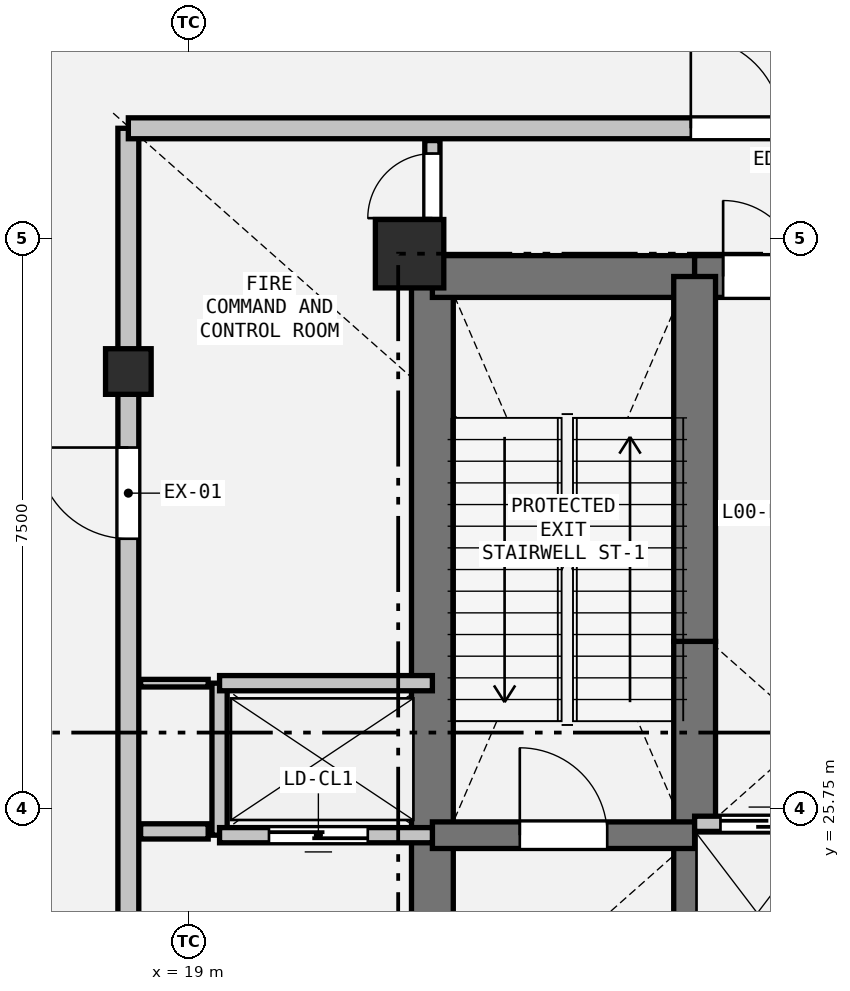
"""IFC4 building model, lengths in metres.
Left out: names, types, materials, properties, quantities, classifications, styles, units other than length and angle.
Written with IfcOpenShell. Run it as: python <this file> out.ifc"""

import sys

from ifc_helpers import new_model, si_unit, direction, frame, frame_2d, origin, origin_2d, place, context, subcontext, project, spatial, rectangle, extrude, element, fill, save


model = new_model("IFC4")
c1 = context("Model", 3, precision=1e-05, world=origin(), true_north=direction((0.0, 1.0)))
c2 = subcontext(c1, "Body", "Model", "MODEL_VIEW")
j1 = project(units=[si_unit("LENGTHUNIT", "METRE"), si_unit("PLANEANGLEUNIT", "RADIAN")], contexts=[c1])
p1 = place(None, origin())
s1 = spatial("IfcSite", under=j1, at=p1, CompositionType="ELEMENT")
p2 = place(p1, origin())
s2 = spatial("IfcBuilding", under=s1, at=p2, CompositionType="ELEMENT")
p3 = place(p2, origin())
s3 = spatial("IfcBuildingStorey", under=s2, at=p3, CompositionType="ELEMENT", Elevation=0.0)
p4 = place(p3, frame((18.2, 31.5, 0.0), z_axis=(0.0, 0.0, 1.0), x_axis=(1.0, 0.0, 0.0)))
e1 = element("IfcColumn", 1, at=p4, inside=s3, PredefinedType="COLUMN", context=c2, shape_type="SweptSolid", body=[
    extrude(rectangle(XDim=0.6, YDim=0.6, at=origin_2d()), origin(), (0.0, 0.0, 1.0), 5.1),
])
p5 = place(p3, frame((21.9, 33.05, 0.0), z_axis=(0.0, 0.0, 1.0), x_axis=(1.0, 0.0, 0.0)))
e2 = element("IfcColumn", 2, at=p5, inside=s3, PredefinedType="COLUMN", context=c2, shape_type="SweptSolid", body=[
    extrude(rectangle(XDim=0.9, YDim=0.9, at=origin_2d()), origin(), (0.0, 0.0, 1.0), 5.1),
])
p6 = place(p3, frame((18.2, 18.8, 0.0), z_axis=(0.0, 0.0, 1.0), x_axis=(0.0, 1.0, 0.0)))
e3 = element("IfcWall", 3, at=p6, inside=s3, PredefinedType="SOLIDWALL", context=c2, shape_type="SweptSolid", body=[
    extrude(rectangle(XDim=15.9, YDim=0.275, at=frame_2d((7.95, 0.0))), origin(), (0.0, 0.0, 1.0), 3.185),
])
p7 = place(p6, frame((10.5, 0.0, 0.0)))
e4 = element("IfcOpeningElement", 4, at=p7, cuts=e3, PredefinedType="OPENING", context=c2, shape_type="SweptSolid", body=[
    extrude(rectangle(XDim=1.2, YDim=2.2, at=frame_2d((0.6, 1.1))), frame((0.0, 0.147, 0.0), z_axis=(0.0, -1.0, 0.0), x_axis=(1.0, 0.0, 0.0)), (0.0, 0.0, 1.0), 0.295),
])
p8 = place(p3, frame((18.2, 34.7, 0.0), z_axis=(0.0, 0.0, 1.0), x_axis=(1.0, 0.0, 0.0)))
e5 = element("IfcWall", 5, at=p8, inside=s3, PredefinedType="SOLIDWALL", context=c2, shape_type="SweptSolid", body=[
    extrude(rectangle(XDim=18.0, YDim=0.275, at=frame_2d((9.0, 0.0))), origin(), (0.0, 0.0, 1.0), 3.185),
])
p9 = place(p8, frame((7.4, 0.0, 0.0)))
e6 = element("IfcOpeningElement", 6, at=p9, cuts=e5, PredefinedType="OPENING", context=c2, shape_type="SweptSolid", body=[
    extrude(rectangle(XDim=2.4, YDim=2.4, at=frame_2d((1.2, 1.2))), frame((0.0, 0.147, 0.0), z_axis=(0.0, -1.0, 0.0), x_axis=(1.0, 0.0, 0.0)), (0.0, 0.0, 1.0), 0.295),
])
p10 = place(p3, frame((22.2, 20.75, 0.0), z_axis=(0.0, 0.0, 1.0), x_axis=(0.0, 1.0, 0.0)))
e7 = element("IfcWall", 7, at=p10, inside=s3, PredefinedType="SHEAR", context=c2, shape_type="SweptSolid", body=[
    extrude(rectangle(XDim=4.65, YDim=0.55, at=frame_2d((2.325, 0.0))), origin(), (0.0, 0.0, 1.0), 4.8),
])
p11 = place(p3, frame((22.2, 25.4, 0.0), z_axis=(0.0, 0.0, 1.0), x_axis=(0.0, 1.0, 0.0)))
e8 = element("IfcWall", 8, at=p11, inside=s3, PredefinedType="SHEAR", context=c2, shape_type="SweptSolid", body=[
    extrude(rectangle(XDim=7.35, YDim=0.55, at=frame_2d((3.675, 0.0))), origin(), (0.0, 0.0, 1.0), 4.8),
])
p12 = place(p3, frame((22.2, 32.75, 0.0), z_axis=(0.0, 0.0, 1.0), x_axis=(1.0, 0.0, 0.0)))
e9 = element("IfcWall", 9, at=p12, inside=s3, PredefinedType="SHEAR", context=c2, shape_type="SweptSolid", body=[
    extrude(rectangle(XDim=3.45, YDim=0.55, at=frame_2d((1.725, 0.0))), origin(), (0.0, 0.0, 1.0), 4.8),
])
p13 = place(p3, frame((25.65, 32.75, 0.0), z_axis=(0.0, 0.0, 1.0), x_axis=(1.0, 0.0, 0.0)))
e10 = element("IfcWall", 10, at=p13, inside=s3, PredefinedType="SHEAR", context=c2, shape_type="SweptSolid", body=[
    extrude(rectangle(XDim=1.75, YDim=0.55, at=frame_2d((0.875, 0.0))), origin(), (0.0, 0.0, 1.0), 4.8),
])
p14 = place(p13, frame((0.375, 0.0, 0.0)))
e11 = element("IfcOpeningElement", 11, at=p14, cuts=e10, PredefinedType="OPENING", context=c2, shape_type="SweptSolid", body=[
    extrude(rectangle(XDim=1.0, YDim=2.15, at=frame_2d((0.5, 1.075))), frame((0.0, 0.285, 0.0), z_axis=(0.0, -1.0, 0.0), x_axis=(1.0, 0.0, 0.0)), (0.0, 0.0, 1.0), 0.57),
])
p15 = place(p3, frame((25.65, 22.75, 0.0), z_axis=(0.0, 0.0, 1.0), x_axis=(0.0, 1.0, 0.0)))
e12 = element("IfcWall", 12, at=p15, inside=s3, PredefinedType="SHEAR", context=c2, shape_type="SweptSolid", body=[
    extrude(rectangle(XDim=2.8, YDim=0.55, at=frame_2d((1.4, 0.0))), origin(), (0.0, 0.0, 1.0), 4.8),
])
p16 = place(p3, frame((25.65, 25.55, 0.0), z_axis=(0.0, 0.0, 1.0), x_axis=(0.0, 1.0, 0.0)))
e13 = element("IfcWall", 13, at=p16, inside=s3, PredefinedType="SHEAR", context=c2, shape_type="SweptSolid", body=[
    extrude(rectangle(XDim=2.4, YDim=0.55, at=frame_2d((1.2, 0.0))), origin(), (0.0, 0.0, 1.0), 4.8),
])
p17 = place(p3, frame((25.65, 27.95, 0.0), z_axis=(0.0, 0.0, 1.0), x_axis=(0.0, 1.0, 0.0)))
e14 = element("IfcWall", 14, at=p17, inside=s3, PredefinedType="SHEAR", context=c2, shape_type="SweptSolid", body=[
    extrude(rectangle(XDim=4.8, YDim=0.55, at=frame_2d((2.4, 0.0))), origin(), (0.0, 0.0, 1.0), 4.8),
])
p18 = place(p3, frame((22.2, 25.4, 0.0), z_axis=(0.0, 0.0, 1.0), x_axis=(1.0, 0.0, 0.0)))
e15 = element("IfcWall", 15, at=p18, inside=s3, PredefinedType="SHEAR", context=c2, shape_type="SweptSolid", body=[
    extrude(rectangle(XDim=3.45, YDim=0.35, at=frame_2d((1.725, 0.0))), origin(), (0.0, 0.0, 1.0), 4.8),
])
p19 = place(p18, frame((1.15, 0.0, 0.0)))
e16 = element("IfcOpeningElement", 16, at=p19, cuts=e15, PredefinedType="OPENING", context=c2, shape_type="SweptSolid", body=[
    extrude(rectangle(XDim=1.15, YDim=2.15, at=frame_2d((0.575, 1.075))), frame((0.0, 0.185, 0.0), z_axis=(0.0, -1.0, 0.0), x_axis=(1.0, 0.0, 0.0)), (0.0, 0.0, 1.0), 0.37),
])
p20 = place(p3, frame((25.65, 25.55, 0.0), z_axis=(0.0, 0.0, 1.0), x_axis=(1.0, 0.0, 0.0)))
e17 = element("IfcWall", 17, at=p20, inside=s3, PredefinedType="PARTITIONING", context=c2, shape_type="SweptSolid", body=[
    extrude(rectangle(XDim=4.95, YDim=0.2, at=frame_2d((2.475, 0.0))), origin(), (0.0, 0.0, 1.0), 4.8),
])
p21 = place(p20, frame((0.34, 0.0, 0.0)))
e18 = element("IfcOpeningElement", 18, at=p21, cuts=e17, PredefinedType="OPENING", context=c2, shape_type="SweptSolid", body=[
    extrude(rectangle(XDim=1.1, YDim=2.15, at=frame_2d((0.55, 1.075))), frame((0.0, 0.11, 0.0), z_axis=(0.0, -1.0, 0.0), x_axis=(1.0, 0.0, 0.0)), (0.0, 0.0, 1.0), 0.22),
])
p22 = place(p20, frame((1.99, 0.0, 0.0)))
e19 = element("IfcOpeningElement", 19, at=p22, cuts=e17, PredefinedType="OPENING", context=c2, shape_type="SweptSolid", body=[
    extrude(rectangle(XDim=1.1, YDim=2.15, at=frame_2d((0.55, 1.075))), frame((0.0, 0.11, 0.0), z_axis=(0.0, -1.0, 0.0), x_axis=(1.0, 0.0, 0.0)), (0.0, 0.0, 1.0), 0.22),
])
p23 = place(p20, frame((3.64, 0.0, 0.0)))
e20 = element("IfcOpeningElement", 20, at=p23, cuts=e17, PredefinedType="OPENING", context=c2, shape_type="SweptSolid", body=[
    extrude(rectangle(XDim=1.1, YDim=2.15, at=frame_2d((0.55, 1.075))), frame((0.0, 0.11, 0.0), z_axis=(0.0, -1.0, 0.0), x_axis=(1.0, 0.0, 0.0)), (0.0, 0.0, 1.0), 0.22),
])
p24 = place(p3, frame((19.4, 25.4, 0.0), z_axis=(0.0, 0.0, 1.0), x_axis=(0.0, 1.0, 0.0)))
e21 = element("IfcWall", 21, at=p24, inside=s3, PredefinedType="PARTITIONING", context=c2, shape_type="SweptSolid", body=[
    extrude(rectangle(XDim=2.0, YDim=0.2, at=frame_2d((1.0, 0.0))), origin(), (0.0, 0.0, 1.0), 3.185),
])
p25 = place(p3, frame((19.4, 27.4, 0.0), z_axis=(0.0, 0.0, 1.0), x_axis=(1.0, 0.0, 0.0)))
e22 = element("IfcWall", 22, at=p25, inside=s3, PredefinedType="PARTITIONING", context=c2, shape_type="SweptSolid", body=[
    extrude(rectangle(XDim=2.8, YDim=0.2, at=frame_2d((1.4, 0.0))), origin(), (0.0, 0.0, 1.0), 4.8),
])
p26 = place(p3, frame((22.2, 25.4, 0.0), z_axis=(0.0, 0.0, 1.0), x_axis=(-1.0, 0.0, 0.0)))
e23 = element("IfcWall", 23, at=p26, inside=s3, PredefinedType="PARTITIONING", context=c2, shape_type="SweptSolid", body=[
    extrude(rectangle(XDim=2.8, YDim=0.2, at=frame_2d((1.4, 0.0))), origin(), (0.0, 0.0, 1.0), 3.185),
])
p27 = place(p26, frame((0.85, 0.0, 0.0)))
e24 = element("IfcOpeningElement", 24, at=p27, cuts=e23, PredefinedType="OPENING", context=c2, shape_type="SweptSolid", body=[
    extrude(rectangle(XDim=1.3, YDim=2.2, at=frame_2d((0.65, 1.1))), frame((0.0, 0.11, 0.0), z_axis=(0.0, -1.0, 0.0), x_axis=(1.0, 0.0, 0.0)), (0.0, 0.0, 1.0), 0.22),
])
p28 = place(p3, frame((22.2, 33.075, 0.0), z_axis=(0.0, 0.0, 1.0), x_axis=(0.0, 1.0, 0.0)))
e25 = element("IfcWall", 25, at=p28, inside=s3, PredefinedType="PARTITIONING", context=c2, shape_type="SweptSolid", body=[
    extrude(rectangle(XDim=1.464, YDim=0.2, at=frame_2d((0.732, 0.0))), origin(), (0.0, 0.0, 1.0), 4.8),
])
p29 = place(p28, frame((0.443, 0.0, 0.0)))
e26 = element("IfcOpeningElement", 26, at=p29, cuts=e25, PredefinedType="OPENING", context=c2, shape_type="SweptSolid", body=[
    extrude(rectangle(XDim=0.85, YDim=2.1, at=frame_2d((0.425, 1.05))), frame((0.0, 0.11, 0.0), z_axis=(0.0, -1.0, 0.0), x_axis=(1.0, 0.0, 0.0)), (0.0, 0.0, 1.0), 0.22),
])
p30 = place(p3, frame((18.362, 25.45, 0.0), z_axis=(0.0, 0.0, 1.0), x_axis=(1.0, 0.0, 0.0)))
e27 = element("IfcWall", 27, at=p30, inside=s3, PredefinedType="PARTITIONING", context=c2, shape_type="SweptSolid", body=[
    extrude(rectangle(XDim=0.888, YDim=0.2, at=frame_2d((0.444, 0.0))), origin(), (0.0, 0.0, 1.0), 3.185),
])
p31 = place(p3, frame((19.25, 27.4, 0.0), z_axis=(0.0, 0.0, 1.0), x_axis=(-1.0, 0.0, 0.0)))
e28 = element("IfcWall", 28, at=p31, inside=s3, PredefinedType="PARTITIONING", context=c2, shape_type="SweptSolid", body=[
    extrude(rectangle(XDim=0.888, YDim=0.1, at=frame_2d((0.444, 0.0))), origin(), (0.0, 0.0, 1.0), 3.185),
])
p32 = place(p9, origin())
e29 = element("IfcDoor", 29, at=p32, inside=s3, OperationType="DOUBLE_DOOR_SINGLE_SWING", PredefinedType="DOOR", context=c2, shape_type="SweptSolid", body=[
    extrude(rectangle(XDim=2.4, YDim=2.4, at=frame_2d((1.2, 1.2))), frame((0.0, 0.025, 0.0), z_axis=(0.0, -1.0, 0.0), x_axis=(1.0, 0.0, 0.0)), (0.0, 0.0, 1.0), 0.05),
])
fill(e6, e29)
p33 = place(p7, origin())
e30 = element("IfcDoor", 30, at=p33, inside=s3, OperationType="SINGLE_SWING_RIGHT", PredefinedType="DOOR", context=c2, shape_type="SweptSolid", body=[
    extrude(rectangle(XDim=1.2, YDim=2.2, at=frame_2d((0.6, 1.1))), frame((0.0, 0.025, 0.0), z_axis=(0.0, -1.0, 0.0), x_axis=(1.0, 0.0, 0.0)), (0.0, 0.0, 1.0), 0.05),
])
fill(e4, e30)
p34 = place(p21, origin())
e31 = element("IfcDoor", 31, at=p34, inside=s3, OperationType="SLIDING_TO_LEFT", PredefinedType="DOOR", context=c2, shape_type="SweptSolid", body=[
    extrude(rectangle(XDim=1.1, YDim=2.15, at=frame_2d((0.55, 1.075))), frame((0.0, 0.025, 0.0), z_axis=(0.0, -1.0, 0.0), x_axis=(1.0, 0.0, 0.0)), (0.0, 0.0, 1.0), 0.05),
])
fill(e18, e31)
p35 = place(p14, origin())
e32 = element("IfcDoor", 32, at=p35, inside=s3, OperationType="SINGLE_SWING_LEFT", PredefinedType="DOOR", context=c2, shape_type="SweptSolid", body=[
    extrude(rectangle(XDim=1.0, YDim=2.15, at=frame_2d((0.5, 1.075))), frame((0.0, 0.025, 0.0), z_axis=(0.0, -1.0, 0.0), x_axis=(1.0, 0.0, 0.0)), (0.0, 0.0, 1.0), 0.05),
])
fill(e11, e32)
p36 = place(p27, origin())
e33 = element("IfcDoor", 33, at=p36, inside=s3, OperationType="SLIDING_TO_LEFT", PredefinedType="DOOR", context=c2, shape_type="SweptSolid", body=[
    extrude(rectangle(XDim=1.3, YDim=2.2, at=frame_2d((0.65, 1.1))), frame((0.0, 0.025, 0.0), z_axis=(0.0, -1.0, 0.0), x_axis=(1.0, 0.0, 0.0)), (0.0, 0.0, 1.0), 0.05),
])
fill(e24, e33)
p37 = place(p19, origin())
e34 = element("IfcDoor", 34, at=p37, inside=s3, OperationType="SINGLE_SWING_LEFT", PredefinedType="DOOR", context=c2, shape_type="SweptSolid", body=[
    extrude(rectangle(XDim=1.15, YDim=2.15, at=frame_2d((0.575, 1.075))), frame((0.0, 0.025, 0.0), z_axis=(0.0, -1.0, 0.0), x_axis=(1.0, 0.0, 0.0)), (0.0, 0.0, 1.0), 0.05),
])
fill(e16, e34)
p38 = place(p29, origin())
e35 = element("IfcDoor", 35, at=p38, inside=s3, OperationType="SINGLE_SWING_LEFT", PredefinedType="DOOR", context=c2, shape_type="SweptSolid", body=[
    extrude(rectangle(XDim=0.85, YDim=2.1, at=frame_2d((0.425, 1.05))), frame((0.0, 0.025, 0.0), z_axis=(0.0, -1.0, 0.0), x_axis=(1.0, 0.0, 0.0)), (0.0, 0.0, 1.0), 0.05),
])
fill(e26, e35)
save(model, sys.argv[1])
